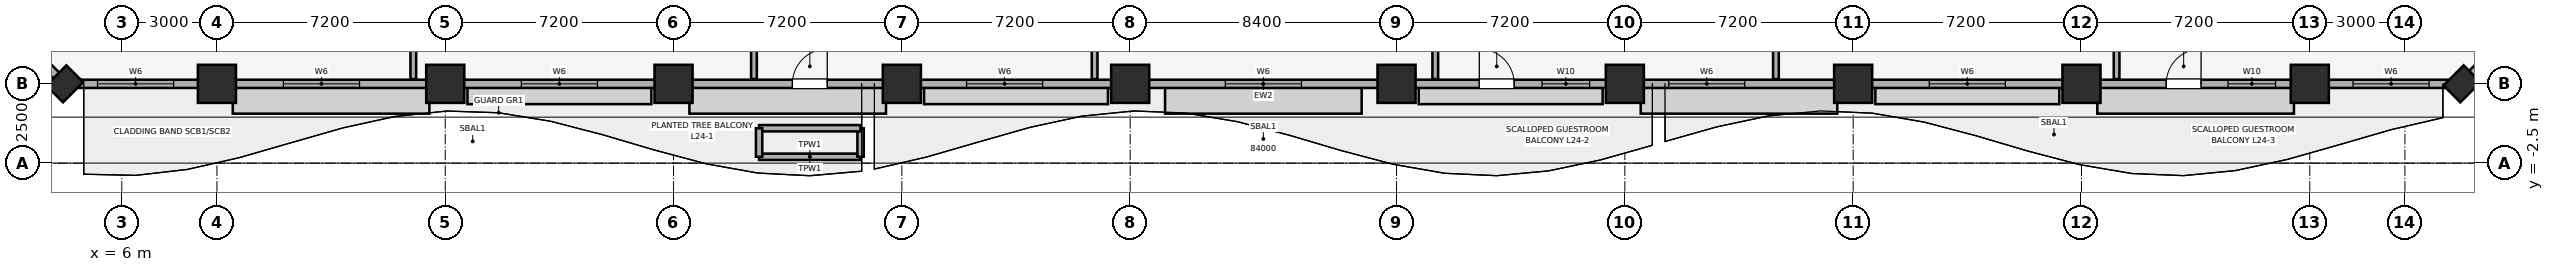
"""IFC4 building model, lengths in metres.
Left out: names, types, materials, properties, quantities, classifications, styles, units other than length and angle.
Written with IfcOpenShell. Run it as: python <this file> out.ifc"""

import sys

from ifc_helpers import new_model, si_unit, direction, frame, frame_2d, origin, origin_2d, place, context, subcontext, project, spatial, rectangle, extrude, element, fill, save


model = new_model("IFC4")
c1 = context("Model", 3, precision=1e-05, world=origin(), true_north=direction((0.0, 1.0)))
c2 = subcontext(c1, "Body", "Model", "MODEL_VIEW")
j1 = project(units=[si_unit("LENGTHUNIT", "METRE"), si_unit("PLANEANGLEUNIT", "RADIAN")], contexts=[c1])
p1 = place(None, origin())
s1 = spatial("IfcSite", under=j1, at=p1, CompositionType="ELEMENT")
p2 = place(p1, origin())
s2 = spatial("IfcBuilding", under=s1, at=p2, CompositionType="ELEMENT")
p3 = place(p2, frame((0.0, 0.0, 104.3)))
s3 = spatial("IfcBuildingStorey", under=s2, at=p3, CompositionType="ELEMENT", Elevation=104.3)
for number, where, z_axis, x_axis in (
    (1, (9.0, 0.0, 0.0), (0.0, 0.0, 1.0), (1.0, 0.0, 0.0)),
    (2, (16.2, 0.0, 0.0), (0.0, 0.0, 1.0), (1.0, 0.0, 0.0)),
    (3, (23.4, 0.0, 0.0), (0.0, 0.0, 1.0), (1.0, 0.0, 0.0)),
    (4, (30.6, 0.0, 0.0), (0.0, 0.0, 1.0), (1.0, 0.0, 0.0)),
    (5, (37.8, 0.0, 0.0), (0.0, 0.0, 1.0), (1.0, 0.0, 0.0)),
    (6, (46.2, 0.0, 0.0), (0.0, 0.0, 1.0), (1.0, 0.0, 0.0)),
    (7, (53.4, 0.0, 0.0), (0.0, 0.0, 1.0), (1.0, 0.0, 0.0)),
    (8, (60.6, 0.0, 0.0), (0.0, 0.0, 1.0), (1.0, 0.0, 0.0)),
    (9, (67.8, 0.0, 0.0), (0.0, 0.0, 1.0), (1.0, 0.0, 0.0)),
    (10, (75.0, 0.0, 0.0), (0.0, 0.0, 1.0), (1.0, 0.0, 0.0)),
):
    element("IfcColumn", number, at=place(p3, frame(where, z_axis=z_axis, x_axis=x_axis)), inside=s3, PredefinedType="COLUMN", context=c2, shape_type="SweptSolid", body=[
        extrude(rectangle(XDim=1.2, YDim=1.2, at=origin_2d()), origin(), (0.0, 0.0, 1.0), 3.51),
    ])
for number, where, z_axis, x_axis in (
    (11, (4.2, 0.0, 0.0), (0.0, 0.0, 1.0), (0.707, 0.707, 0.0)),
    (12, (79.8, 0.0, 0.0), (0.0, 0.0, 1.0), (0.707, 0.707, 0.0)),
):
    element("IfcColumn", number, at=place(p3, frame(where, z_axis=z_axis, x_axis=x_axis)), inside=s3, PredefinedType="PILASTER", context=c2, shape_type="SweptSolid", body=[
        extrude(rectangle(XDim=0.9, YDim=0.75, at=origin_2d()), origin(), (0.0, 0.0, 1.0), 3.51),
    ])
p4 = place(p3, frame((4.2, 0.0, 0.0), z_axis=(0.0, 0.0, 1.0), x_axis=(1.0, 0.0, 0.0)))
e13 = element("IfcWall", 13, at=p4, inside=s3, PredefinedType="SOLIDWALL", context=c2, shape_type="SweptSolid", body=[
    extrude(rectangle(XDim=75.6, YDim=0.26, at=frame_2d((37.8, 0.0))), origin(), (0.0, 0.0, 1.0), 2.56),
])
p5 = place(p4, frame((22.948, 0.0, 0.0)))
e14 = element("IfcOpeningElement", 14, at=p5, cuts=e13, PredefinedType="OPENING", context=c2, shape_type="SweptSolid", body=[
    extrude(rectangle(XDim=1.1, YDim=2.15, at=frame_2d((0.55, 1.075))), frame((0.0, 0.14, 0.0), z_axis=(0.0, -1.0, 0.0), x_axis=(1.0, 0.0, 0.0)), (0.0, 0.0, 1.0), 0.28),
])
p6 = place(p4, frame((44.61, 0.0, 0.0)))
e15 = element("IfcOpeningElement", 15, at=p6, cuts=e13, PredefinedType="OPENING", context=c2, shape_type="SweptSolid", body=[
    extrude(rectangle(XDim=1.1, YDim=2.15, at=frame_2d((0.55, 1.075))), frame((0.0, 0.14, 0.0), z_axis=(0.0, -1.0, 0.0), x_axis=(1.0, 0.0, 0.0)), (0.0, 0.0, 1.0), 0.28),
])
p7 = place(p4, frame((66.272, 0.0, 0.0)))
e16 = element("IfcOpeningElement", 16, at=p7, cuts=e13, PredefinedType="OPENING", context=c2, shape_type="SweptSolid", body=[
    extrude(rectangle(XDim=1.1, YDim=2.15, at=frame_2d((0.55, 1.075))), frame((0.0, 0.14, 0.0), z_axis=(0.0, -1.0, 0.0), x_axis=(1.0, 0.0, 0.0)), (0.0, 0.0, 1.0), 0.28),
])
p8 = place(p4, frame((1.035, 0.0, 0.85)))
e17 = element("IfcOpeningElement", 17, at=p8, cuts=e13, PredefinedType="OPENING", context=c2, shape_type="SweptSolid", body=[
    extrude(rectangle(XDim=2.4, YDim=1.5, at=frame_2d((1.2, 0.75))), frame((0.0, 0.14, 0.0), z_axis=(0.0, -1.0, 0.0), x_axis=(1.0, 0.0, 0.0)), (0.0, 0.0, 1.0), 0.28),
])
p9 = place(p4, frame((6.896, 0.0, 0.85)))
e18 = element("IfcOpeningElement", 18, at=p9, cuts=e13, PredefinedType="OPENING", context=c2, shape_type="SweptSolid", body=[
    extrude(rectangle(XDim=2.4, YDim=1.5, at=frame_2d((1.2, 0.75))), frame((0.0, 0.14, 0.0), z_axis=(0.0, -1.0, 0.0), x_axis=(1.0, 0.0, 0.0)), (0.0, 0.0, 1.0), 0.28),
])
p10 = place(p4, frame((14.4, 0.0, 0.85)))
e19 = element("IfcOpeningElement", 19, at=p10, cuts=e13, PredefinedType="OPENING", context=c2, shape_type="SweptSolid", body=[
    extrude(rectangle(XDim=2.4, YDim=1.5, at=frame_2d((1.2, 0.75))), frame((0.0, 0.14, 0.0), z_axis=(0.0, -1.0, 0.0), x_axis=(1.0, 0.0, 0.0)), (0.0, 0.0, 1.0), 0.28),
])
p11 = place(p4, frame((28.439, 0.0, 0.85)))
e20 = element("IfcOpeningElement", 20, at=p11, cuts=e13, PredefinedType="OPENING", context=c2, shape_type="SweptSolid", body=[
    extrude(rectangle(XDim=2.4, YDim=1.5, at=frame_2d((1.2, 0.75))), frame((0.0, 0.14, 0.0), z_axis=(0.0, -1.0, 0.0), x_axis=(1.0, 0.0, 0.0)), (0.0, 0.0, 1.0), 0.28),
])
p12 = place(p4, frame((36.6, 0.0, 0.85)))
e21 = element("IfcOpeningElement", 21, at=p12, cuts=e13, PredefinedType="OPENING", context=c2, shape_type="SweptSolid", body=[
    extrude(rectangle(XDim=2.4, YDim=1.5, at=frame_2d((1.2, 0.75))), frame((0.0, 0.14, 0.0), z_axis=(0.0, -1.0, 0.0), x_axis=(1.0, 0.0, 0.0)), (0.0, 0.0, 1.0), 0.28),
])
p13 = place(p4, frame((46.59, 0.0, 0.85)))
e22 = element("IfcOpeningElement", 22, at=p13, cuts=e13, PredefinedType="OPENING", context=c2, shape_type="SweptSolid", body=[
    extrude(rectangle(XDim=1.5, YDim=1.4, at=frame_2d((0.75, 0.7))), frame((0.0, 0.14, 0.0), z_axis=(0.0, -1.0, 0.0), x_axis=(1.0, 0.0, 0.0)), (0.0, 0.0, 1.0), 0.28),
])
p14 = place(p4, frame((50.583, 0.0, 0.85)))
e23 = element("IfcOpeningElement", 23, at=p14, cuts=e13, PredefinedType="OPENING", context=c2, shape_type="SweptSolid", body=[
    extrude(rectangle(XDim=2.4, YDim=1.5, at=frame_2d((1.2, 0.75))), frame((0.0, 0.14, 0.0), z_axis=(0.0, -1.0, 0.0), x_axis=(1.0, 0.0, 0.0)), (0.0, 0.0, 1.0), 0.28),
])
p15 = place(p4, frame((58.8, 0.0, 0.85)))
e24 = element("IfcOpeningElement", 24, at=p15, cuts=e13, PredefinedType="OPENING", context=c2, shape_type="SweptSolid", body=[
    extrude(rectangle(XDim=2.4, YDim=1.5, at=frame_2d((1.2, 0.75))), frame((0.0, 0.14, 0.0), z_axis=(0.0, -1.0, 0.0), x_axis=(1.0, 0.0, 0.0)), (0.0, 0.0, 1.0), 0.28),
])
p16 = place(p4, frame((68.221, 0.0, 0.85)))
e25 = element("IfcOpeningElement", 25, at=p16, cuts=e13, PredefinedType="OPENING", context=c2, shape_type="SweptSolid", body=[
    extrude(rectangle(XDim=1.5, YDim=1.4, at=frame_2d((0.75, 0.7))), frame((0.0, 0.14, 0.0), z_axis=(0.0, -1.0, 0.0), x_axis=(1.0, 0.0, 0.0)), (0.0, 0.0, 1.0), 0.28),
])
p17 = place(p4, frame((72.165, 0.0, 0.85)))
e26 = element("IfcOpeningElement", 26, at=p17, cuts=e13, PredefinedType="OPENING", context=c2, shape_type="SweptSolid", body=[
    extrude(rectangle(XDim=2.4, YDim=1.5, at=frame_2d((1.2, 0.75))), frame((0.0, 0.14, 0.0), z_axis=(0.0, -1.0, 0.0), x_axis=(1.0, 0.0, 0.0)), (0.0, 0.0, 1.0), 0.28),
])
for number, where, z_axis, x_axis in (
    (27, (79.8, 0.0, 0.0), (0.0, 0.0, 1.0), (0.707, 0.707, 0.0)),
    (28, (0.0, 4.2, 0.0), (0.0, 0.0, 1.0), (0.707, -0.707, 0.0)),
):
    element("IfcWall", number, at=place(p3, frame(where, z_axis=z_axis, x_axis=x_axis)), inside=s3, PredefinedType="SOLIDWALL", context=c2, shape_type="SweptSolid", body=[
        extrude(rectangle(XDim=5.94, YDim=0.26, at=frame_2d((2.97, 0.0))), origin(), (0.0, 0.0, 1.0), 2.56),
    ])
p18 = place(p3, frame((26.098, -2.3, 0.0), z_axis=(0.0, 0.0, 1.0), x_axis=(1.0, 0.0, 0.0)))
e29 = element("IfcWall", 29, at=p18, inside=s3, PredefinedType="PARAPET", context=c2, shape_type="SweptSolid", body=[
    extrude(rectangle(XDim=3.2, YDim=0.2, at=frame_2d((1.6, 0.0))), origin(), (0.0, 0.0, 1.0), 0.55),
])
p19 = place(p3, frame((29.298, -2.3, 0.0), z_axis=(0.0, 0.0, 1.0), x_axis=(0.0, 1.0, 0.0)))
e30 = element("IfcWall", 30, at=p19, inside=s3, PredefinedType="PARAPET", context=c2, shape_type="SweptSolid", body=[
    extrude(rectangle(XDim=0.9, YDim=0.2, at=frame_2d((0.45, 0.0))), origin(), (0.0, 0.0, 1.0), 0.55),
])
p20 = place(p3, frame((29.298, -1.4, 0.0), z_axis=(0.0, 0.0, 1.0), x_axis=(-1.0, 0.0, 0.0)))
e31 = element("IfcWall", 31, at=p20, inside=s3, PredefinedType="PARAPET", context=c2, shape_type="SweptSolid", body=[
    extrude(rectangle(XDim=3.2, YDim=0.2, at=frame_2d((1.6, 0.0))), origin(), (0.0, 0.0, 1.0), 0.55),
])
p21 = place(p3, frame((26.098, -1.4, 0.0), z_axis=(0.0, 0.0, 1.0), x_axis=(0.0, -1.0, 0.0)))
e32 = element("IfcWall", 32, at=p21, inside=s3, PredefinedType="PARAPET", context=c2, shape_type="SweptSolid", body=[
    extrude(rectangle(XDim=0.9, YDim=0.2, at=frame_2d((0.45, 0.0))), origin(), (0.0, 0.0, 1.0), 0.55),
])
for number, where, z_axis, x_axis in (
    (33, (15.193, 0.15, 0.0), (0.0, 0.0, 1.0), (0.0, 1.0, 0.0)),
    (34, (25.936, 0.15, 0.0), (0.0, 0.0, 1.0), (0.0, 1.0, 0.0)),
    (35, (36.679, 0.15, 0.0), (0.0, 0.0, 1.0), (0.0, 1.0, 0.0)),
    (36, (47.422, 0.15, 0.0), (0.0, 0.0, 1.0), (0.0, 1.0, 0.0)),
    (37, (58.165, 0.15, 0.0), (0.0, 0.0, 1.0), (0.0, 1.0, 0.0)),
    (38, (68.907, 0.15, 0.0), (0.0, 0.0, 1.0), (0.0, 1.0, 0.0)),
):
    element("IfcWall", number, at=place(p3, frame(where, z_axis=z_axis, x_axis=x_axis)), inside=s3, PredefinedType="PARTITIONING", context=c2, shape_type="SweptSolid", body=[
        extrude(rectangle(XDim=21.755, YDim=0.18, at=frame_2d((10.877, 0.0))), origin(), (0.0, 0.0, 1.0), 3.51),
    ])
p22 = place(p5, origin())
e39 = element("IfcDoor", 39, at=p22, inside=s3, OperationType="SINGLE_SWING_RIGHT", PredefinedType="DOOR", context=c2, shape_type="SweptSolid", body=[
    extrude(rectangle(XDim=1.1, YDim=2.15, at=frame_2d((0.55, 1.075))), frame((0.0, 0.025, 0.0), z_axis=(0.0, -1.0, 0.0), x_axis=(1.0, 0.0, 0.0)), (0.0, 0.0, 1.0), 0.05),
])
fill(e14, e39)
p23 = place(p6, origin())
e40 = element("IfcDoor", 40, at=p23, inside=s3, OperationType="SINGLE_SWING_LEFT", PredefinedType="DOOR", context=c2, shape_type="SweptSolid", body=[
    extrude(rectangle(XDim=1.1, YDim=2.15, at=frame_2d((0.55, 1.075))), frame((0.0, 0.025, 0.0), z_axis=(0.0, -1.0, 0.0), x_axis=(1.0, 0.0, 0.0)), (0.0, 0.0, 1.0), 0.05),
])
fill(e15, e40)
p24 = place(p7, origin())
e41 = element("IfcDoor", 41, at=p24, inside=s3, OperationType="SINGLE_SWING_RIGHT", PredefinedType="DOOR", context=c2, shape_type="SweptSolid", body=[
    extrude(rectangle(XDim=1.1, YDim=2.15, at=frame_2d((0.55, 1.075))), frame((0.0, 0.025, 0.0), z_axis=(0.0, -1.0, 0.0), x_axis=(1.0, 0.0, 0.0)), (0.0, 0.0, 1.0), 0.05),
])
fill(e16, e41)
p25 = place(p8, origin())
e42 = element("IfcWindow", 42, at=p25, inside=s3, PartitioningType="SINGLE_PANEL", PredefinedType="WINDOW", context=c2, shape_type="SweptSolid", body=[
    extrude(rectangle(XDim=2.4, YDim=1.5, at=frame_2d((1.2, 0.75))), frame((0.0, 0.03, 0.0), z_axis=(0.0, -1.0, 0.0), x_axis=(1.0, 0.0, 0.0)), (0.0, 0.0, 1.0), 0.06),
])
fill(e17, e42)
p26 = place(p9, origin())
e43 = element("IfcWindow", 43, at=p26, inside=s3, PartitioningType="SINGLE_PANEL", PredefinedType="WINDOW", context=c2, shape_type="SweptSolid", body=[
    extrude(rectangle(XDim=2.4, YDim=1.5, at=frame_2d((1.2, 0.75))), frame((0.0, 0.03, 0.0), z_axis=(0.0, -1.0, 0.0), x_axis=(1.0, 0.0, 0.0)), (0.0, 0.0, 1.0), 0.06),
])
fill(e18, e43)
p27 = place(p10, origin())
e44 = element("IfcWindow", 44, at=p27, inside=s3, PartitioningType="SINGLE_PANEL", PredefinedType="WINDOW", context=c2, shape_type="SweptSolid", body=[
    extrude(rectangle(XDim=2.4, YDim=1.5, at=frame_2d((1.2, 0.75))), frame((0.0, 0.03, 0.0), z_axis=(0.0, -1.0, 0.0), x_axis=(1.0, 0.0, 0.0)), (0.0, 0.0, 1.0), 0.06),
])
fill(e19, e44)
p28 = place(p11, origin())
e45 = element("IfcWindow", 45, at=p28, inside=s3, PartitioningType="SINGLE_PANEL", PredefinedType="WINDOW", context=c2, shape_type="SweptSolid", body=[
    extrude(rectangle(XDim=2.4, YDim=1.5, at=frame_2d((1.2, 0.75))), frame((0.0, 0.03, 0.0), z_axis=(0.0, -1.0, 0.0), x_axis=(1.0, 0.0, 0.0)), (0.0, 0.0, 1.0), 0.06),
])
fill(e20, e45)
p29 = place(p12, origin())
e46 = element("IfcWindow", 46, at=p29, inside=s3, PartitioningType="SINGLE_PANEL", PredefinedType="WINDOW", context=c2, shape_type="SweptSolid", body=[
    extrude(rectangle(XDim=2.4, YDim=1.5, at=frame_2d((1.2, 0.75))), frame((0.0, 0.03, 0.0), z_axis=(0.0, -1.0, 0.0), x_axis=(1.0, 0.0, 0.0)), (0.0, 0.0, 1.0), 0.06),
])
fill(e21, e46)
p30 = place(p13, origin())
e47 = element("IfcWindow", 47, at=p30, inside=s3, PartitioningType="SINGLE_PANEL", PredefinedType="WINDOW", context=c2, shape_type="SweptSolid", body=[
    extrude(rectangle(XDim=1.5, YDim=1.4, at=frame_2d((0.75, 0.7))), frame((0.0, 0.03, 0.0), z_axis=(0.0, -1.0, 0.0), x_axis=(1.0, 0.0, 0.0)), (0.0, 0.0, 1.0), 0.06),
])
fill(e22, e47)
p31 = place(p14, origin())
e48 = element("IfcWindow", 48, at=p31, inside=s3, PartitioningType="SINGLE_PANEL", PredefinedType="WINDOW", context=c2, shape_type="SweptSolid", body=[
    extrude(rectangle(XDim=2.4, YDim=1.5, at=frame_2d((1.2, 0.75))), frame((0.0, 0.03, 0.0), z_axis=(0.0, -1.0, 0.0), x_axis=(1.0, 0.0, 0.0)), (0.0, 0.0, 1.0), 0.06),
])
fill(e23, e48)
p32 = place(p15, origin())
e49 = element("IfcWindow", 49, at=p32, inside=s3, PartitioningType="SINGLE_PANEL", PredefinedType="WINDOW", context=c2, shape_type="SweptSolid", body=[
    extrude(rectangle(XDim=2.4, YDim=1.5, at=frame_2d((1.2, 0.75))), frame((0.0, 0.03, 0.0), z_axis=(0.0, -1.0, 0.0), x_axis=(1.0, 0.0, 0.0)), (0.0, 0.0, 1.0), 0.06),
])
fill(e24, e49)
p33 = place(p16, origin())
e50 = element("IfcWindow", 50, at=p33, inside=s3, PartitioningType="SINGLE_PANEL", PredefinedType="WINDOW", context=c2, shape_type="SweptSolid", body=[
    extrude(rectangle(XDim=1.5, YDim=1.4, at=frame_2d((0.75, 0.7))), frame((0.0, 0.03, 0.0), z_axis=(0.0, -1.0, 0.0), x_axis=(1.0, 0.0, 0.0)), (0.0, 0.0, 1.0), 0.06),
])
fill(e25, e50)
p34 = place(p17, origin())
e51 = element("IfcWindow", 51, at=p34, inside=s3, PartitioningType="SINGLE_PANEL", PredefinedType="WINDOW", context=c2, shape_type="SweptSolid", body=[
    extrude(rectangle(XDim=2.4, YDim=1.5, at=frame_2d((1.2, 0.75))), frame((0.0, 0.03, 0.0), z_axis=(0.0, -1.0, 0.0), x_axis=(1.0, 0.0, 0.0)), (0.0, 0.0, 1.0), 0.06),
])
fill(e26, e51)
save(model, sys.argv[1])
